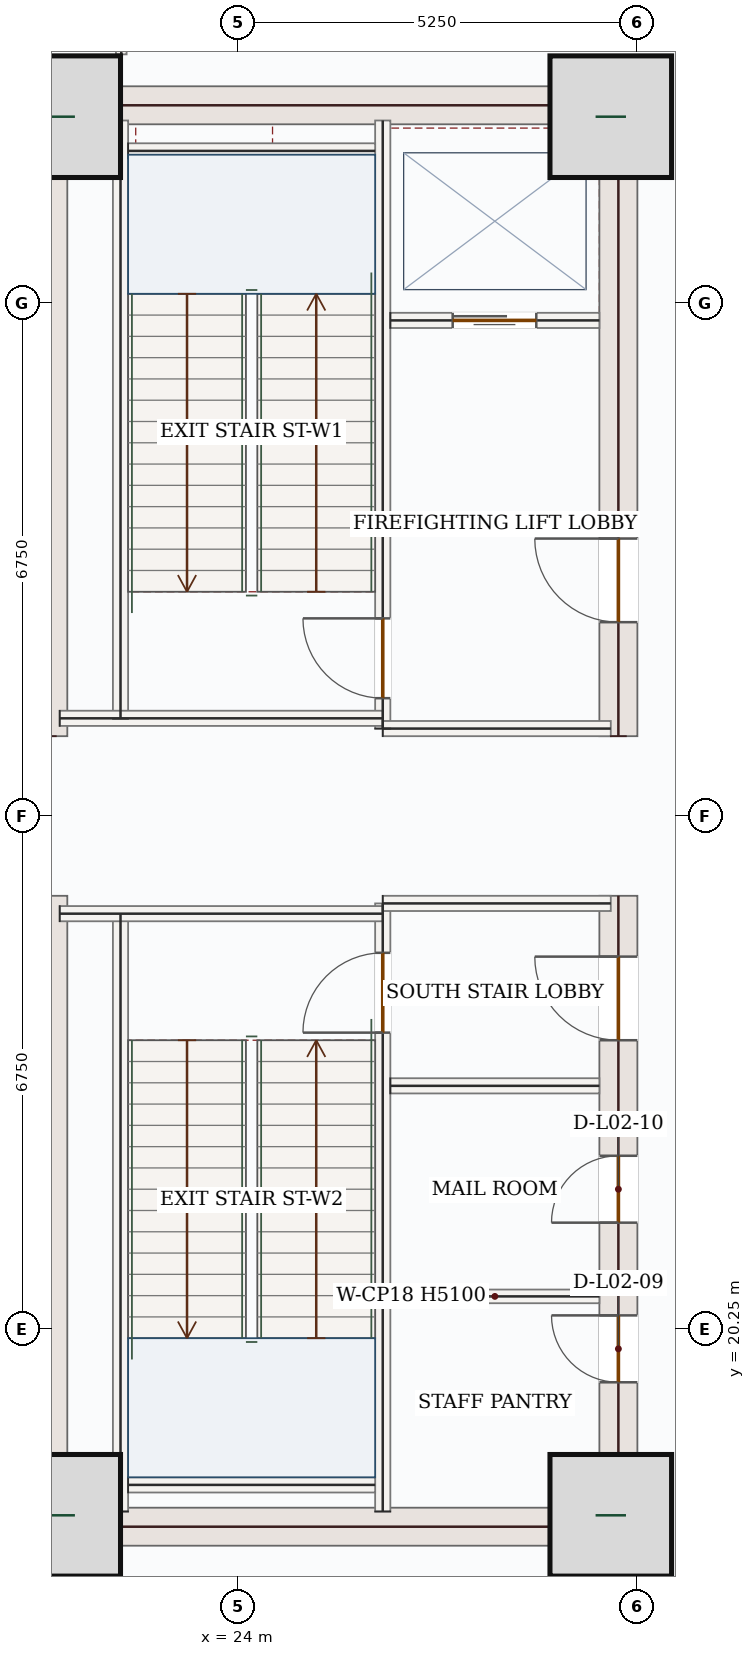
"""IFC4 building model, lengths in metres.
Left out: names, types, materials, properties, quantities, classifications, styles, units other than length and angle.
Written with IfcOpenShell. Run it as: python <this file> out.ifc"""

import sys

from ifc_helpers import new_model, si_unit, direction, frame, frame_2d, origin, origin_2d, place, context, subcontext, project, spatial, rectangle, extrude, source, transform, mapped, element, fill, save


model = new_model("IFC4")
c1 = context("Model", 3, precision=1e-05, world=origin(), true_north=direction((0.0, 1.0)))
c2 = subcontext(c1, "Body", "Model", "MODEL_VIEW")
j1 = project(units=[si_unit("LENGTHUNIT", "METRE"), si_unit("PLANEANGLEUNIT", "RADIAN")], contexts=[c1])
p1 = place(None, origin())
s1 = spatial("IfcSite", under=j1, at=p1, CompositionType="ELEMENT")
p2 = place(p1, origin())
s2 = spatial("IfcBuilding", under=s1, at=p2, CompositionType="ELEMENT")
p3 = place(p2, frame((0.0, 0.0, 12.6)))
s3 = spatial("IfcBuildingStorey", under=s2, at=p3, CompositionType="ELEMENT", Elevation=12.6)
m1 = source(origin(), c2, "Body", "SweptSolid", [
    extrude(rectangle(XDim=8.55, YDim=0.5, at=frame_2d((4.275, 0.0))), origin(), (0.0, 0.0, 1.0), 5.1),
])
for number, where, z_axis, x_axis in (
    (1, (21.5, 17.4, 0.0), (0.0, 0.0, 1.0), (0.0, 1.0, 0.0)),
    (2, (21.5, 28.05, 0.0), (0.0, 0.0, 1.0), (0.0, 1.0, 0.0)),
):
    element("IfcWall", number, at=place(p3, frame(where, z_axis=z_axis, x_axis=x_axis)), inside=s3, PredefinedType="SHEAR", context=c2, shape_type="MappedRepresentation", body=[
        mapped(m1, transform((0.0, 0.0, 0.0), x_axis=(1.0, 0.0, 0.0), y_axis=(0.0, 1.0, 0.0), z_axis=(0.0, 0.0, 1.0), scale=1.0)),
    ])
p4 = place(p3, frame((29.0, 17.4, 0.0), z_axis=(0.0, 0.0, 1.0), x_axis=(0.0, 1.0, 0.0)))
e3 = element("IfcWall", 3, at=p4, inside=s3, PredefinedType="SHEAR", context=c2, shape_type="SweptSolid", body=[
    extrude(rectangle(XDim=8.55, YDim=0.5, at=frame_2d((4.275, 0.0))), origin(), (0.0, 0.0, 1.0), 5.1),
])
p5 = place(p4, frame((6.65, 0.0, 0.0)))
e4 = element("IfcOpeningElement", 4, at=p5, cuts=e3, PredefinedType="OPENING", context=c2, shape_type="SweptSolid", body=[
    extrude(rectangle(XDim=1.1, YDim=2.2, at=frame_2d((0.55, 1.1))), frame((0.0, 0.26, 0.0), z_axis=(0.0, -1.0, 0.0), x_axis=(1.0, 0.0, 0.0)), (0.0, 0.0, 1.0), 0.52),
])
p6 = place(p4, frame((2.15, 0.0, 0.0)))
e5 = element("IfcOpeningElement", 5, at=p6, cuts=e3, PredefinedType="OPENING", context=c2, shape_type="SweptSolid", body=[
    extrude(rectangle(XDim=0.88, YDim=2.1, at=frame_2d((0.44, 1.05))), frame((0.0, 0.26, 0.0), z_axis=(0.0, -1.0, 0.0), x_axis=(1.0, 0.0, 0.0)), (0.0, 0.0, 1.0), 0.52),
])
p7 = place(p4, frame((4.25, 0.0, 0.0)))
e6 = element("IfcOpeningElement", 6, at=p7, cuts=e3, PredefinedType="OPENING", context=c2, shape_type="SweptSolid", body=[
    extrude(rectangle(XDim=0.88, YDim=2.1, at=frame_2d((0.44, 1.05))), frame((0.0, 0.26, 0.0), z_axis=(0.0, -1.0, 0.0), x_axis=(1.0, 0.0, 0.0)), (0.0, 0.0, 1.0), 0.52),
])
p8 = place(p3, frame((29.0, 28.05, 0.0), z_axis=(0.0, 0.0, 1.0), x_axis=(0.0, 1.0, 0.0)))
e7 = element("IfcWall", 7, at=p8, inside=s3, PredefinedType="SHEAR", context=c2, shape_type="SweptSolid", body=[
    extrude(rectangle(XDim=8.55, YDim=0.5, at=frame_2d((4.275, 0.0))), origin(), (0.0, 0.0, 1.0), 5.1),
])
p9 = place(p8, frame((1.5, 0.0, 0.0)))
e8 = element("IfcOpeningElement", 8, at=p9, cuts=e7, PredefinedType="OPENING", context=c2, shape_type="SweptSolid", body=[
    extrude(rectangle(XDim=1.1, YDim=2.2, at=frame_2d((0.55, 1.1))), frame((0.0, 0.26, 0.0), z_axis=(0.0, -1.0, 0.0), x_axis=(1.0, 0.0, 0.0)), (0.0, 0.0, 1.0), 0.52),
])
m2 = source(origin(), c2, "Body", "SweptSolid", [
    extrude(rectangle(XDim=7.0, YDim=0.5, at=frame_2d((3.5, 0.0))), origin(), (0.0, 0.0, 1.0), 5.1),
])
for number, where, z_axis, x_axis in (
    (9, (21.75, 17.65, 0.0), (0.0, 0.0, 1.0), (1.0, 0.0, 0.0)),
    (10, (21.75, 36.35, 0.0), (0.0, 0.0, 1.0), (1.0, 0.0, 0.0)),
):
    element("IfcWall", number, at=place(p3, frame(where, z_axis=z_axis, x_axis=x_axis)), inside=s3, PredefinedType="SHEAR", context=c2, shape_type="MappedRepresentation", body=[
        mapped(m2, transform((0.0, 0.0, 0.0), x_axis=(1.0, 0.0, 0.0), y_axis=(0.0, 1.0, 0.0), z_axis=(0.0, 0.0, 1.0), scale=1.0)),
    ])
m3 = source(origin(), c2, "Body", "SweptSolid", [
    extrude(rectangle(XDim=1.6, YDim=1.6, at=origin_2d()), origin(), (0.0, 0.0, 1.0), 5.4),
])
for number, where, z_axis, x_axis in (
    (11, (21.65, 17.8, 0.0), (0.0, 0.0, 1.0), (1.0, 0.0, 0.0)),
    (12, (28.9, 17.8, 0.0), (0.0, 0.0, 1.0), (1.0, 0.0, 0.0)),
    (13, (21.65, 36.2, 0.0), (0.0, 0.0, 1.0), (1.0, 0.0, 0.0)),
    (14, (28.9, 36.2, 0.0), (0.0, 0.0, 1.0), (1.0, 0.0, 0.0)),
):
    element("IfcColumn", number, at=place(p3, frame(where, z_axis=z_axis, x_axis=x_axis)), inside=s3, PredefinedType="COLUMN", context=c2, shape_type="MappedRepresentation", body=[
        mapped(m3, transform((0.0, 0.0, 0.0), x_axis=(1.0, 0.0, 0.0), y_axis=(0.0, 1.0, 0.0), z_axis=(0.0, 0.0, 1.0), scale=1.0)),
    ])
m4 = source(origin(), c2, "Body", "SweptSolid", [
    extrude(rectangle(XDim=7.87, YDim=0.2, at=frame_2d((3.935, 0.0))), origin(), (0.0, 0.0, 1.0), 5.1),
])
for number, where, z_axis, x_axis in (
    (15, (22.45, 17.85, 0.0), (0.0, 0.0, 1.0), (0.0, 1.0, 0.0)),
    (16, (22.45, 28.28, 0.0), (0.0, 0.0, 1.0), (0.0, 1.0, 0.0)),
):
    element("IfcWall", number, at=place(p3, frame(where, z_axis=z_axis, x_axis=x_axis)), inside=s3, PredefinedType="SOLIDWALL", context=c2, shape_type="MappedRepresentation", body=[
        mapped(m4, transform((0.0, 0.0, 0.0), x_axis=(1.0, 0.0, 0.0), y_axis=(0.0, 1.0, 0.0), z_axis=(0.0, 0.0, 1.0), scale=1.0)),
    ])
p10 = place(p3, frame((25.9, 17.85, 0.0), z_axis=(0.0, 0.0, 1.0), x_axis=(0.0, 1.0, 0.0)))
e17 = element("IfcWall", 17, at=p10, inside=s3, PredefinedType="SOLIDWALL", context=c2, shape_type="SweptSolid", body=[
    extrude(rectangle(XDim=8.0, YDim=0.2, at=frame_2d((4.0, 0.0))), origin(), (0.0, 0.0, 1.0), 5.1),
])
p11 = place(p10, frame((6.3, 0.0, 0.0)))
e18 = element("IfcOpeningElement", 18, at=p11, cuts=e17, PredefinedType="OPENING", context=c2, shape_type="SweptSolid", body=[
    extrude(rectangle(XDim=1.05, YDim=2.15, at=frame_2d((0.525, 1.075))), frame((0.0, 0.11, 0.0), z_axis=(0.0, -1.0, 0.0), x_axis=(1.0, 0.0, 0.0)), (0.0, 0.0, 1.0), 0.22),
])
p12 = place(p3, frame((25.9, 28.15, 0.0), z_axis=(0.0, 0.0, 1.0), x_axis=(0.0, 1.0, 0.0)))
e19 = element("IfcWall", 19, at=p12, inside=s3, PredefinedType="SOLIDWALL", context=c2, shape_type="SweptSolid", body=[
    extrude(rectangle(XDim=8.0, YDim=0.2, at=frame_2d((4.0, 0.0))), origin(), (0.0, 0.0, 1.0), 5.1),
])
p13 = place(p12, frame((0.4, 0.0, 0.0)))
e20 = element("IfcOpeningElement", 20, at=p13, cuts=e19, PredefinedType="OPENING", context=c2, shape_type="SweptSolid", body=[
    extrude(rectangle(XDim=1.05, YDim=2.15, at=frame_2d((0.525, 1.075))), frame((0.0, 0.11, 0.0), z_axis=(0.0, -1.0, 0.0), x_axis=(1.0, 0.0, 0.0)), (0.0, 0.0, 1.0), 0.22),
])
m5 = source(origin(), c2, "Body", "SweptSolid", [
    extrude(rectangle(XDim=4.25, YDim=0.2, at=frame_2d((2.125, 0.0))), origin(), (0.0, 0.0, 1.0), 5.1),
])
p14 = place(p3, frame((21.65, 25.715, 0.0), z_axis=(0.0, 0.0, 1.0), x_axis=(1.0, 0.0, 0.0)))
e21 = element("IfcWall", 21, at=p14, inside=s3, PredefinedType="SOLIDWALL", context=c2, shape_type="MappedRepresentation", body=[
    mapped(m5, transform((0.0, 0.0, 0.0), x_axis=(1.0, 0.0, 0.0), y_axis=(0.0, 1.0, 0.0), z_axis=(0.0, 0.0, 1.0), scale=1.0)),
])
m6 = source(origin(), c2, "Body", "SweptSolid", [
    extrude(rectangle(XDim=3.0, YDim=0.2, at=frame_2d((1.5, 0.0))), origin(), (0.0, 0.0, 1.0), 5.1),
])
p15 = place(p3, frame((25.9, 25.85, 0.0), z_axis=(0.0, 0.0, 1.0), x_axis=(1.0, 0.0, 0.0)))
e22 = element("IfcWall", 22, at=p15, inside=s3, PredefinedType="SOLIDWALL", context=c2, shape_type="MappedRepresentation", body=[
    mapped(m6, transform((0.0, 0.0, 0.0), x_axis=(1.0, 0.0, 0.0), y_axis=(0.0, 1.0, 0.0), z_axis=(0.0, 0.0, 1.0), scale=1.0)),
])
p16 = place(p3, frame((21.65, 28.285, 0.0), z_axis=(0.0, 0.0, 1.0), x_axis=(1.0, 0.0, 0.0)))
e23 = element("IfcWall", 23, at=p16, inside=s3, PredefinedType="SOLIDWALL", context=c2, shape_type="MappedRepresentation", body=[
    mapped(m5, transform((0.0, 0.0, 0.0), x_axis=(1.0, 0.0, 0.0), y_axis=(0.0, 1.0, 0.0), z_axis=(0.0, 0.0, 1.0), scale=1.0)),
])
p17 = place(p3, frame((25.9, 28.15, 0.0), z_axis=(0.0, 0.0, 1.0), x_axis=(1.0, 0.0, 0.0)))
e24 = element("IfcWall", 24, at=p17, inside=s3, PredefinedType="SOLIDWALL", context=c2, shape_type="MappedRepresentation", body=[
    mapped(m6, transform((0.0, 0.0, 0.0), x_axis=(1.0, 0.0, 0.0), y_axis=(0.0, 1.0, 0.0), z_axis=(0.0, 0.0, 1.0), scale=1.0)),
])
m7 = source(origin(), c2, "Body", "SweptSolid", [
    extrude(rectangle(XDim=3.25, YDim=0.2, at=frame_2d((1.625, 0.0))), origin(), (0.0, 0.0, 1.0), 5.1),
])
for number, where, z_axis, x_axis in (
    (25, (22.55, 35.75, 0.0), (0.0, 0.0, 1.0), (1.0, 0.0, 0.0)),
    (26, (22.55, 18.2, 0.0), (0.0, 0.0, 1.0), (1.0, 0.0, 0.0)),
):
    element("IfcWall", number, at=place(p3, frame(where, z_axis=z_axis, x_axis=x_axis)), inside=s3, PredefinedType="SOLIDWALL", context=c2, shape_type="MappedRepresentation", body=[
        mapped(m7, transform((0.0, 0.0, 0.0), x_axis=(1.0, 0.0, 0.0), y_axis=(0.0, 1.0, 0.0), z_axis=(0.0, 0.0, 1.0), scale=1.0)),
    ])
p18 = place(p3, frame((26.0, 33.52, 0.0), z_axis=(0.0, 0.0, 1.0), x_axis=(1.0, 0.0, 0.0)))
e27 = element("IfcWall", 27, at=p18, inside=s3, PredefinedType="SOLIDWALL", context=c2, shape_type="SweptSolid", body=[
    extrude(rectangle(XDim=2.75, YDim=0.2, at=frame_2d((1.375, 0.0))), origin(), (0.0, 0.0, 1.0), 5.1),
])
p19 = place(p18, frame((0.82, 0.0, 0.0)))
e28 = element("IfcOpeningElement", 28, at=p19, cuts=e27, PredefinedType="OPENING", context=c2, shape_type="SweptSolid", body=[
    extrude(rectangle(XDim=1.1, YDim=2.15, at=frame_2d((0.55, 1.075))), frame((0.0, 0.11, 0.0), z_axis=(0.0, -1.0, 0.0), x_axis=(1.0, 0.0, 0.0)), (0.0, 0.0, 1.0), 0.22),
])
m8 = source(origin(), c2, "Body", "SweptSolid", [
    extrude(rectangle(XDim=2.75, YDim=0.2, at=frame_2d((1.375, 0.0))), origin(), (0.0, 0.0, 1.0), 5.1),
])
p20 = place(p3, frame((26.0, 23.45, 0.0), z_axis=(0.0, 0.0, 1.0), x_axis=(1.0, 0.0, 0.0)))
e29 = element("IfcWall", 29, at=p20, inside=s3, PredefinedType="SOLIDWALL", context=c2, shape_type="MappedRepresentation", body=[
    mapped(m8, transform((0.0, 0.0, 0.0), x_axis=(1.0, 0.0, 0.0), y_axis=(0.0, 1.0, 0.0), z_axis=(0.0, 0.0, 1.0), scale=1.0)),
])
m9 = source(origin(), c2, "Body", "SweptSolid", [
    extrude(rectangle(XDim=2.75, YDim=0.18, at=frame_2d((1.375, 0.0))), origin(), (0.0, 0.0, 1.0), 5.1),
])
p21 = place(p3, frame((26.0, 20.68, 0.0), z_axis=(0.0, 0.0, 1.0), x_axis=(1.0, 0.0, 0.0)))
e30 = element("IfcWall", 30, at=p21, inside=s3, PredefinedType="PARTITIONING", context=c2, shape_type="MappedRepresentation", body=[
    mapped(m9, transform((0.0, 0.0, 0.0), x_axis=(1.0, 0.0, 0.0), y_axis=(0.0, 1.0, 0.0), z_axis=(0.0, 0.0, 1.0), scale=1.0)),
])
m10 = source(origin(), c2, "Body", "SweptSolid", [
    extrude(rectangle(XDim=1.826, YDim=0.14, at=frame_2d((0.913, 0.0))), origin(), (0.0, 0.0, 1.0), 5.1),
])
p22 = place(p3, frame((22.46, 38.846, 0.0), z_axis=(0.0, 0.0, 1.0), x_axis=(0.0, -1.0, 0.0)))
e31 = element("IfcWall", 31, at=p22, inside=s3, PredefinedType="PARTITIONING", context=c2, shape_type="MappedRepresentation", body=[
    mapped(m10, transform((0.0, 0.0, 0.0), x_axis=(1.0, 0.0, 0.0), y_axis=(0.0, 1.0, 0.0), z_axis=(0.0, 0.0, 1.0), scale=1.0)),
])
m11 = source(origin(), c2, "Body", "SweptSolid", [
    extrude(rectangle(XDim=1.05, YDim=2.15, at=frame_2d((0.525, 1.075))), frame((0.0, 0.025, 0.0), z_axis=(0.0, -1.0, 0.0), x_axis=(1.0, 0.0, 0.0)), (0.0, 0.0, 1.0), 0.05),
])
p23 = place(p13, origin())
e32 = element("IfcDoor", 32, at=p23, inside=s3, OperationType="SINGLE_SWING_RIGHT", PredefinedType="DOOR", context=c2, shape_type="MappedRepresentation", body=[
    mapped(m11, transform((0.0, 0.0, 0.0), x_axis=(1.0, 0.0, 0.0), y_axis=(0.0, 1.0, 0.0), z_axis=(0.0, 0.0, 1.0), scale=1.0)),
])
fill(e20, e32)
p24 = place(p11, origin())
e33 = element("IfcDoor", 33, at=p24, inside=s3, OperationType="SINGLE_SWING_LEFT", PredefinedType="DOOR", context=c2, shape_type="MappedRepresentation", body=[
    mapped(m11, transform((0.0, 0.0, 0.0), x_axis=(1.0, 0.0, 0.0), y_axis=(0.0, 1.0, 0.0), z_axis=(0.0, 0.0, 1.0), scale=1.0)),
])
fill(e18, e33)
m12 = source(origin(), c2, "Body", "SweptSolid", [
    extrude(rectangle(XDim=1.1, YDim=2.15, at=frame_2d((0.55, 1.075))), frame((0.0, 0.025, 0.0), z_axis=(0.0, -1.0, 0.0), x_axis=(1.0, 0.0, 0.0)), (0.0, 0.0, 1.0), 0.05),
])
p25 = place(p19, origin())
e34 = element("IfcDoor", 34, at=p25, inside=s3, OperationType="DOUBLE_DOOR_SLIDING", PredefinedType="DOOR", context=c2, shape_type="MappedRepresentation", body=[
    mapped(m12, transform((0.0, 0.0, 0.0), x_axis=(1.0, 0.0, 0.0), y_axis=(0.0, 1.0, 0.0), z_axis=(0.0, 0.0, 1.0), scale=1.0)),
])
fill(e28, e34)
m13 = source(origin(), c2, "Body", "SweptSolid", [
    extrude(rectangle(XDim=1.1, YDim=2.2, at=frame_2d((0.55, 1.1))), frame((0.0, 0.025, 0.0), z_axis=(0.0, -1.0, 0.0), x_axis=(1.0, 0.0, 0.0)), (0.0, 0.0, 1.0), 0.05),
])
p26 = place(p9, origin())
e35 = element("IfcDoor", 35, at=p26, inside=s3, OperationType="SINGLE_SWING_RIGHT", PredefinedType="DOOR", context=c2, shape_type="MappedRepresentation", body=[
    mapped(m13, transform((0.0, 0.0, 0.0), x_axis=(1.0, 0.0, 0.0), y_axis=(0.0, 1.0, 0.0), z_axis=(0.0, 0.0, 1.0), scale=1.0)),
])
fill(e8, e35)
p27 = place(p5, origin())
e36 = element("IfcDoor", 36, at=p27, inside=s3, OperationType="SINGLE_SWING_RIGHT", PredefinedType="DOOR", context=c2, shape_type="MappedRepresentation", body=[
    mapped(m13, transform((0.0, 0.0, 0.0), x_axis=(1.0, 0.0, 0.0), y_axis=(0.0, 1.0, 0.0), z_axis=(0.0, 0.0, 1.0), scale=1.0)),
])
fill(e4, e36)
m14 = source(origin(), c2, "Body", "SweptSolid", [
    extrude(rectangle(XDim=0.88, YDim=2.1, at=frame_2d((0.44, 1.05))), frame((0.0, 0.025, 0.0), z_axis=(0.0, -1.0, 0.0), x_axis=(1.0, 0.0, 0.0)), (0.0, 0.0, 1.0), 0.05),
])
p28 = place(p6, origin())
e37 = element("IfcDoor", 37, at=p28, inside=s3, OperationType="SINGLE_SWING_RIGHT", PredefinedType="DOOR", context=c2, shape_type="MappedRepresentation", body=[
    mapped(m14, transform((0.0, 0.0, 0.0), x_axis=(1.0, 0.0, 0.0), y_axis=(0.0, 1.0, 0.0), z_axis=(0.0, 0.0, 1.0), scale=1.0)),
])
fill(e5, e37)
p29 = place(p7, origin())
e38 = element("IfcDoor", 38, at=p29, inside=s3, OperationType="SINGLE_SWING_LEFT", PredefinedType="DOOR", context=c2, shape_type="MappedRepresentation", body=[
    mapped(m14, transform((0.0, 0.0, 0.0), x_axis=(1.0, 0.0, 0.0), y_axis=(0.0, 1.0, 0.0), z_axis=(0.0, 0.0, 1.0), scale=1.0)),
])
fill(e6, e38)
save(model, sys.argv[1])
